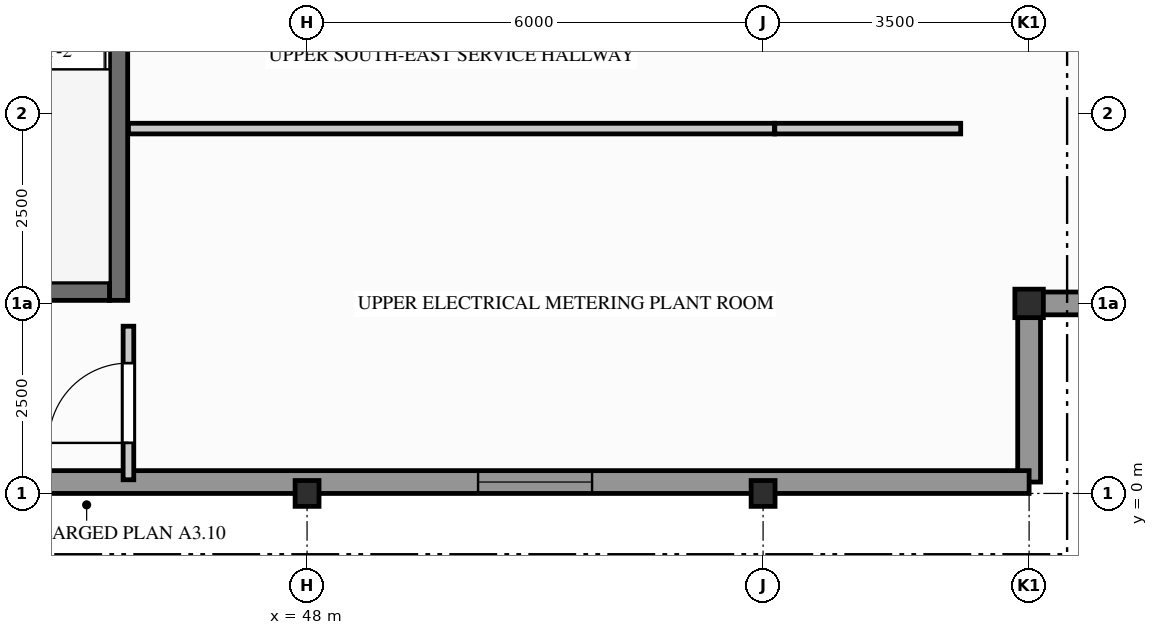
"""IFC4 building model, lengths in metres.
Left out: names, types, materials, properties, quantities, classifications, styles, units other than length and angle.
Written with IfcOpenShell. Run it as: python <this file> out.ifc"""

import sys

from ifc_helpers import new_model, si_unit, direction, frame, frame_2d, origin, origin_2d, place, context, subcontext, project, spatial, rectangle, i_section, extrude, element, fill, save


model = new_model("IFC4")
c1 = context("Model", 3, precision=1e-05, world=origin(), true_north=direction((0.0, 1.0)))
c2 = subcontext(c1, "Body", "Model", "MODEL_VIEW")
j1 = project(units=[si_unit("LENGTHUNIT", "METRE"), si_unit("PLANEANGLEUNIT", "RADIAN")], contexts=[c1])
p1 = place(None, origin())
s1 = spatial("IfcSite", under=j1, at=p1, CompositionType="ELEMENT")
p2 = place(p1, origin())
s2 = spatial("IfcBuilding", under=s1, at=p2, CompositionType="ELEMENT")
p3 = place(p2, frame((0.0, 0.0, 243.65)))
s3 = spatial("IfcBuildingStorey", under=s2, at=p3, CompositionType="ELEMENT", Elevation=243.65)
for number, where, z_axis, x_axis in (
    (1, (48.0, 0.0, 0.0), (0.0, 0.0, 1.0), (1.0, 0.0, 0.0)),
    (2, (54.0, 0.0, 0.0), (0.0, 0.0, 1.0), (1.0, 0.0, 0.0)),
):
    element("IfcColumn", number, at=place(p3, frame(where, z_axis=z_axis, x_axis=x_axis)), inside=s3, PredefinedType="COLUMN", context=c2, shape_type="SweptSolid", body=[
        extrude(i_section(OverallWidth=0.314, OverallDepth=0.34, WebThickness=0.019, FlangeThickness=0.031, FilletRadius=0.015, at=origin_2d()), origin(), (0.0, 0.0, 1.0), 3.6),
    ])
p4 = place(p3, frame((57.5, 2.5, 0.0), z_axis=(0.0, 0.0, 1.0), x_axis=(1.0, 0.0, 0.0)))
e3 = element("IfcColumn", 3, at=p4, inside=s3, PredefinedType="COLUMN", context=c2, shape_type="SweptSolid", body=[
    extrude(i_section(OverallWidth=0.375, OverallDepth=0.375, WebThickness=0.017, FlangeThickness=0.027, FilletRadius=0.015, at=origin_2d()), origin(), (0.0, 0.0, 1.0), 3.6),
])
for number, where, z_axis, x_axis in (
    (4, (57.5, 0.15, 0.0), (0.0, 0.0, 1.0), (0.0, 1.0, 0.0)),
    (5, (57.5, 2.5, 0.0), (0.0, 0.0, 1.0), (1.0, 0.0, 0.0)),
):
    element("IfcWall", number, at=place(p3, frame(where, z_axis=z_axis, x_axis=x_axis)), inside=s3, PredefinedType="STANDARD", context=c2, shape_type="SweptSolid", body=[
        extrude(rectangle(XDim=2.35, YDim=0.3, at=frame_2d((1.175, 0.0))), origin(), (0.0, 0.0, 1.0), 3.34),
    ])
p5 = place(p3, frame((29.75, 0.15, 0.0), z_axis=(0.0, 0.0, 1.0), x_axis=(1.0, 0.0, 0.0)))
e6 = element("IfcWall", 6, at=p5, inside=s3, PredefinedType="STANDARD", context=c2, shape_type="SweptSolid", body=[
    extrude(rectangle(XDim=27.75, YDim=0.3, at=frame_2d((13.875, 0.0))), origin(), (0.0, 0.0, 1.0), 2.776),
])
p6 = place(p5, frame((2.5, 0.0, 1.05)))
e7 = element("IfcOpeningElement", 7, at=p6, cuts=e6, PredefinedType="OPENING", context=c2, shape_type="SweptSolid", body=[
    extrude(rectangle(XDim=0.8, YDim=1.4, at=frame_2d((0.4, 0.7))), frame((0.0, 0.16, 0.0), z_axis=(0.0, -1.0, 0.0), x_axis=(1.0, 0.0, 0.0)), (0.0, 0.0, 1.0), 0.32),
])
p7 = place(p5, frame((20.5, 0.0, 0.755)))
e8 = element("IfcOpeningElement", 8, at=p7, cuts=e6, PredefinedType="OPENING", context=c2, shape_type="SweptSolid", body=[
    extrude(rectangle(XDim=1.5, YDim=1.8, at=frame_2d((0.75, 0.9))), frame((0.0, 0.16, 0.0), z_axis=(0.0, -1.0, 0.0), x_axis=(1.0, 0.0, 0.0)), (0.0, 0.0, 1.0), 0.32),
])
p8 = place(p3, frame((45.52, 2.54, 0.0), z_axis=(0.0, 0.0, 1.0), x_axis=(0.0, 1.0, 0.0)))
e9 = element("IfcWall", 9, at=p8, inside=s3, PredefinedType="SHEAR", context=c2, shape_type="SweptSolid", body=[
    extrude(rectangle(XDim=7.2, YDim=0.24, at=frame_2d((3.6, 0.0))), origin(), (0.0, 0.0, 1.0), 3.34),
])
p9 = place(p3, frame((42.45, 2.66, 0.0), z_axis=(0.0, 0.0, 1.0), x_axis=(1.0, 0.0, 0.0)))
e10 = element("IfcWall", 10, at=p9, inside=s3, PredefinedType="SHEAR", context=c2, shape_type="SweptSolid", body=[
    extrude(rectangle(XDim=2.95, YDim=0.24, at=frame_2d((1.475, 0.0))), origin(), (0.0, 0.0, 1.0), 3.34),
])
p10 = place(p3, frame((45.65, 0.18, 0.0), z_axis=(0.0, 0.0, 1.0), x_axis=(0.0, 1.0, 0.0)))
e11 = element("IfcWall", 11, at=p10, inside=s3, PredefinedType="PARTITIONING", context=c2, shape_type="SweptSolid", body=[
    extrude(rectangle(XDim=2.02, YDim=0.14, at=frame_2d((1.01, 0.0))), origin(), (0.0, 0.0, 1.0), 3.34),
])
p11 = place(p10, frame((0.485, 0.0, 0.0)))
e12 = element("IfcOpeningElement", 12, at=p11, cuts=e11, PredefinedType="OPENING", context=c2, shape_type="SweptSolid", body=[
    extrude(rectangle(XDim=1.05, YDim=2.06, at=frame_2d((0.525, 1.03))), frame((0.0, 0.08, 0.0), z_axis=(0.0, -1.0, 0.0), x_axis=(1.0, 0.0, 0.0)), (0.0, 0.0, 1.0), 0.16),
])
p12 = place(p3, frame((45.65, 4.8, 0.0), z_axis=(0.0, 0.0, 1.0), x_axis=(1.0, 0.0, 0.0)))
e13 = element("IfcWall", 13, at=p12, inside=s3, PredefinedType="PARTITIONING", context=c2, shape_type="SweptSolid", body=[
    extrude(rectangle(XDim=8.5, YDim=0.14, at=frame_2d((4.25, 0.0))), origin(), (0.0, 0.0, 1.0), 2.703),
])
p13 = place(p3, frame((54.154, 4.8, 0.0), z_axis=(0.0, 0.0, 1.0), x_axis=(1.0, 0.0, 0.0)))
e14 = element("IfcWall", 14, at=p13, inside=s3, PredefinedType="PARTITIONING", context=c2, shape_type="SweptSolid", body=[
    extrude(rectangle(XDim=2.446, YDim=0.14, at=frame_2d((1.223, 0.0))), origin(), (0.0, 0.0, 1.0), 3.34),
])
p14 = place(p7, origin())
e15 = element("IfcWindow", 15, at=p14, inside=s3, PartitioningType="SINGLE_PANEL", PredefinedType="WINDOW", context=c2, shape_type="SweptSolid", body=[
    extrude(rectangle(XDim=1.5, YDim=1.8, at=frame_2d((0.75, 0.9))), frame((0.0, 0.03, 0.0), z_axis=(0.0, -1.0, 0.0), x_axis=(1.0, 0.0, 0.0)), (0.0, 0.0, 1.0), 0.06),
])
fill(e8, e15)
p15 = place(p11, origin())
e16 = element("IfcDoor", 16, at=p15, inside=s3, OperationType="SINGLE_SWING_LEFT", PredefinedType="DOOR", context=c2, shape_type="SweptSolid", body=[
    extrude(rectangle(XDim=1.05, YDim=2.06, at=frame_2d((0.525, 1.03))), frame((0.0, 0.025, 0.0), z_axis=(0.0, -1.0, 0.0), x_axis=(1.0, 0.0, 0.0)), (0.0, 0.0, 1.0), 0.05),
])
fill(e12, e16)
save(model, sys.argv[1])
